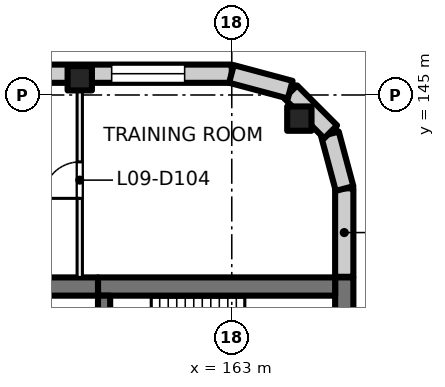
"""IFC4 building model, lengths in metres.
Left out: names, types, materials, properties, quantities, classifications, styles, units other than length and angle.
Written with IfcOpenShell. Run it as: python <this file> out.ifc"""

import sys

from ifc_helpers import new_model, si_unit, direction, frame, frame_2d, origin, origin_2d, place, context, subcontext, project, spatial, rectangle, extrude, element, fill, save


model = new_model("IFC4")
c1 = context("Model", 3, precision=1e-05, world=origin(), true_north=direction((0.0, 1.0)))
c2 = subcontext(c1, "Body", "Model", "MODEL_VIEW")
j1 = project(units=[si_unit("LENGTHUNIT", "METRE"), si_unit("PLANEANGLEUNIT", "RADIAN")], contexts=[c1])
p1 = place(None, origin())
s1 = spatial("IfcSite", under=j1, at=p1, CompositionType="ELEMENT")
p2 = place(p1, origin())
s2 = spatial("IfcBuilding", under=s1, at=p2, CompositionType="ELEMENT")
p3 = place(p2, frame((0.0, 0.0, 43.5)))
s3 = spatial("IfcBuildingStorey", under=s2, at=p3, CompositionType="ELEMENT", Elevation=43.5)
for number, where, z_axis, x_axis in (
    (1, (165.223, 144.223, 0.0), (0.0, 0.0, 1.0), (1.0, 0.0, 0.0)),
    (2, (158.0, 145.55, 0.0), (0.0, 0.0, 1.0), (1.0, 0.0, 0.0)),
):
    element("IfcColumn", number, at=place(p3, frame(where, z_axis=z_axis, x_axis=x_axis)), inside=s3, PredefinedType="COLUMN", context=c2, shape_type="SweptSolid", body=[
        extrude(rectangle(XDim=0.8, YDim=0.8, at=origin_2d()), origin(), (0.0, 0.0, 1.0), 4.0),
    ])
p4 = place(p3, frame((166.7, 139.0, 0.0), z_axis=(0.0, 0.0, 1.0), x_axis=(0.0, -1.0, 0.0)))
e3 = element("IfcWall", 3, at=p4, inside=s3, PredefinedType="SHEAR", context=c2, shape_type="SweptSolid", body=[
    extrude(rectangle(XDim=3.8, YDim=0.6, at=frame_2d((1.9, 0.0))), origin(), (0.0, 0.0, 1.0), 4.0),
])
p5 = place(p3, frame((166.4, 138.7, 0.0), z_axis=(0.0, 0.0, 1.0), x_axis=(-1.0, 0.0, 0.0)))
e4 = element("IfcWall", 4, at=p5, inside=s3, PredefinedType="SHEAR", context=c2, shape_type="SweptSolid", body=[
    extrude(rectangle(XDim=7.8, YDim=0.6, at=frame_2d((3.9, 0.0))), origin(), (0.0, 0.0, 1.0), 4.0),
])
p6 = place(p3, frame((158.6, 138.7, 0.0), z_axis=(0.0, 0.0, 1.0), x_axis=(-1.0, 0.0, 0.0)))
e5 = element("IfcWall", 5, at=p6, inside=s3, PredefinedType="SHEAR", context=c2, shape_type="SweptSolid", body=[
    extrude(rectangle(XDim=4.6, YDim=0.6, at=frame_2d((2.3, 0.0))), origin(), (0.0, 0.0, 1.0), 4.0),
])
p7 = place(p3, frame((158.8, 138.4, 0.0), z_axis=(0.0, 0.0, 1.0), x_axis=(0.0, -1.0, 0.0)))
e6 = element("IfcWall", 6, at=p7, inside=s3, PredefinedType="SHEAR", context=c2, shape_type="SweptSolid", body=[
    extrude(rectangle(XDim=2.8, YDim=0.4, at=frame_2d((1.4, 0.0))), origin(), (0.0, 0.0, 1.0), 4.0),
])
p8 = place(p7, frame((0.9, 0.0, 0.0)))
e7 = element("IfcOpeningElement", 7, at=p8, cuts=e6, PredefinedType="OPENING", context=c2, shape_type="SweptSolid", body=[
    extrude(rectangle(XDim=1.0, YDim=2.1, at=frame_2d((0.5, 1.05))), frame((0.0, 0.21, 0.0), z_axis=(0.0, -1.0, 0.0), x_axis=(1.0, 0.0, 0.0)), (0.0, 0.0, 1.0), 0.42),
])
p9 = place(p3, frame((131.07, 145.7, 0.0), z_axis=(0.0, 0.0, 1.0), x_axis=(1.0, 0.0, 0.0)))
e8 = element("IfcWall", 8, at=p9, inside=s3, PredefinedType="SOLIDWALL", context=c2, shape_type="SweptSolid", body=[
    extrude(rectangle(XDim=31.93, YDim=0.6, at=frame_2d((15.965, 0.0))), origin(), (0.0, 0.0, 1.0), 3.625),
])
p10 = place(p9, frame((0.98, 0.0, 0.9)))
e9 = element("IfcOpeningElement", 9, at=p10, cuts=e8, PredefinedType="OPENING", context=c2, shape_type="SweptSolid", body=[
    extrude(rectangle(XDim=2.4, YDim=2.4, at=frame_2d((1.2, 1.2))), frame((0.0, 0.31, 0.0), z_axis=(0.0, -1.0, 0.0), x_axis=(1.0, 0.0, 0.0)), (0.0, 0.0, 1.0), 0.62),
])
p11 = place(p9, frame((5.48, 0.0, 0.9)))
e10 = element("IfcOpeningElement", 10, at=p11, cuts=e8, PredefinedType="OPENING", context=c2, shape_type="SweptSolid", body=[
    extrude(rectangle(XDim=2.4, YDim=2.4, at=frame_2d((1.2, 1.2))), frame((0.0, 0.31, 0.0), z_axis=(0.0, -1.0, 0.0), x_axis=(1.0, 0.0, 0.0)), (0.0, 0.0, 1.0), 0.62),
])
p12 = place(p9, frame((9.98, 0.0, 0.9)))
e11 = element("IfcOpeningElement", 11, at=p12, cuts=e8, PredefinedType="OPENING", context=c2, shape_type="SweptSolid", body=[
    extrude(rectangle(XDim=2.4, YDim=2.4, at=frame_2d((1.2, 1.2))), frame((0.0, 0.31, 0.0), z_axis=(0.0, -1.0, 0.0), x_axis=(1.0, 0.0, 0.0)), (0.0, 0.0, 1.0), 0.62),
])
p13 = place(p9, frame((14.48, 0.0, 0.9)))
e12 = element("IfcOpeningElement", 12, at=p13, cuts=e8, PredefinedType="OPENING", context=c2, shape_type="SweptSolid", body=[
    extrude(rectangle(XDim=2.4, YDim=2.4, at=frame_2d((1.2, 1.2))), frame((0.0, 0.31, 0.0), z_axis=(0.0, -1.0, 0.0), x_axis=(1.0, 0.0, 0.0)), (0.0, 0.0, 1.0), 0.62),
])
p14 = place(p9, frame((18.98, 0.0, 0.9)))
e13 = element("IfcOpeningElement", 13, at=p14, cuts=e8, PredefinedType="OPENING", context=c2, shape_type="SweptSolid", body=[
    extrude(rectangle(XDim=2.4, YDim=2.4, at=frame_2d((1.2, 1.2))), frame((0.0, 0.31, 0.0), z_axis=(0.0, -1.0, 0.0), x_axis=(1.0, 0.0, 0.0)), (0.0, 0.0, 1.0), 0.62),
])
p15 = place(p9, frame((23.48, 0.0, 0.9)))
e14 = element("IfcOpeningElement", 14, at=p15, cuts=e8, PredefinedType="OPENING", context=c2, shape_type="SweptSolid", body=[
    extrude(rectangle(XDim=2.4, YDim=2.4, at=frame_2d((1.2, 1.2))), frame((0.0, 0.31, 0.0), z_axis=(0.0, -1.0, 0.0), x_axis=(1.0, 0.0, 0.0)), (0.0, 0.0, 1.0), 0.62),
])
p16 = place(p9, frame((27.98, 0.0, 0.9)))
e15 = element("IfcOpeningElement", 15, at=p16, cuts=e8, PredefinedType="OPENING", context=c2, shape_type="SweptSolid", body=[
    extrude(rectangle(XDim=2.4, YDim=2.4, at=frame_2d((1.2, 1.2))), frame((0.0, 0.31, 0.0), z_axis=(0.0, -1.0, 0.0), x_axis=(1.0, 0.0, 0.0)), (0.0, 0.0, 1.0), 0.62),
])
p17 = place(p3, frame((166.7, 141.93, 0.0), z_axis=(0.0, 0.0, 1.0), x_axis=(0.0, -1.0, 0.0)))
e16 = element("IfcWall", 16, at=p17, inside=s3, PredefinedType="SOLIDWALL", context=c2, shape_type="SweptSolid", body=[
    extrude(rectangle(XDim=2.91, YDim=0.6, at=frame_2d((1.455, 0.0))), origin(), (0.0, 0.0, 1.0), 3.625),
])
for number, where, z_axis, x_axis in (
    (17, (166.229, 143.719, 0.0), (0.0, 0.0, 1.0), (0.259, -0.966, 0.0)),
    (18, (164.936, 145.104, 0.0), (0.0, 0.0, 1.0), (0.707, -0.707, 0.0)),
):
    element("IfcWall", number, at=place(p3, frame(where, z_axis=z_axis, x_axis=x_axis)), inside=s3, PredefinedType="SOLIDWALL", context=c2, shape_type="SweptSolid", body=[
        extrude(rectangle(XDim=1.861, YDim=0.6, at=frame_2d((0.93, 0.0))), origin(), (0.0, 0.0, 1.0), 3.625),
    ])
p18 = place(p3, frame((162.99, 145.692, 0.0), z_axis=(0.0, 0.0, 1.0), x_axis=(0.965920269068, -0.258839784042, 0.0)))
e19 = element("IfcWall", 19, at=p18, inside=s3, PredefinedType="SOLIDWALL", context=c2, shape_type="SweptSolid", body=[
    extrude(rectangle(XDim=2.0, YDim=0.6, at=frame_2d((1.0, 0.0))), origin(), (0.0, 0.0, 1.0), 3.625),
])
p19 = place(p3, frame((158.0, 139.0, 0.0), z_axis=(0.0, 0.0, 1.0), x_axis=(0.0, 1.0, 0.0)))
e20 = element("IfcWall", 20, at=p19, inside=s3, PredefinedType="PARTITIONING", context=c2, shape_type="SweptSolid", body=[
    extrude(rectangle(XDim=6.4, YDim=0.175, at=frame_2d((3.2, 0.0))), origin(), (0.0, 0.0, 1.0), 3.625),
])
p20 = place(p19, frame((2.6, 0.0, 0.0)))
e21 = element("IfcOpeningElement", 21, at=p20, cuts=e20, PredefinedType="OPENING", context=c2, shape_type="SweptSolid", body=[
    extrude(rectangle(XDim=1.2, YDim=2.1, at=frame_2d((0.6, 1.05))), frame((0.0, 0.097, 0.0), z_axis=(0.0, -1.0, 0.0), x_axis=(1.0, 0.0, 0.0)), (0.0, 0.0, 1.0), 0.195),
])
p21 = place(p16, origin())
e22 = element("IfcWindow", 22, at=p21, inside=s3, PartitioningType="SINGLE_PANEL", PredefinedType="WINDOW", context=c2, shape_type="SweptSolid", body=[
    extrude(rectangle(XDim=2.4, YDim=2.4, at=frame_2d((1.2, 1.2))), frame((0.0, 0.03, 0.0), z_axis=(0.0, -1.0, 0.0), x_axis=(1.0, 0.0, 0.0)), (0.0, 0.0, 1.0), 0.06),
])
fill(e15, e22)
p22 = place(p20, origin())
e23 = element("IfcDoor", 23, at=p22, inside=s3, OperationType="DOUBLE_DOOR_SINGLE_SWING", PredefinedType="DOOR", context=c2, shape_type="SweptSolid", body=[
    extrude(rectangle(XDim=1.2, YDim=2.1, at=frame_2d((0.6, 1.05))), frame((0.0, 0.025, 0.0), z_axis=(0.0, -1.0, 0.0), x_axis=(1.0, 0.0, 0.0)), (0.0, 0.0, 1.0), 0.05),
])
fill(e21, e23)
save(model, sys.argv[1])
